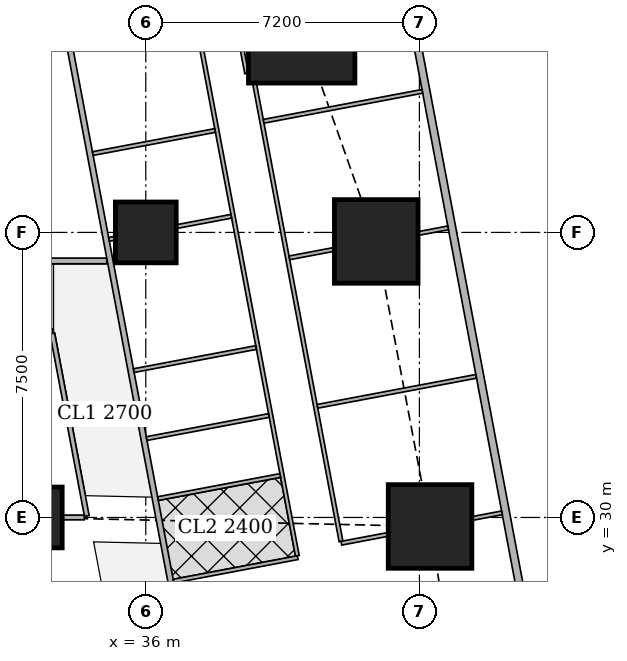
"""IFC4 building model, lengths in metres.
Left out: names, types, materials, properties, quantities, classifications, styles, units other than length and angle.
Written with IfcOpenShell. Run it as: python <this file> out.ifc"""

import sys

from ifc_helpers import new_model, si_unit, direction, frame, frame_2d, origin, origin_2d, place, context, subcontext, project, spatial, rectangle, extrude, element, fill, save


model = new_model("IFC4")
c1 = context("Model", 3, precision=1e-05, world=origin(), true_north=direction((0.0, 1.0)))
c2 = subcontext(c1, "Body", "Model", "MODEL_VIEW")
j1 = project(units=[si_unit("LENGTHUNIT", "METRE"), si_unit("PLANEANGLEUNIT", "RADIAN")], contexts=[c1])
p1 = place(None, origin())
s1 = spatial("IfcSite", under=j1, at=p1, CompositionType="ELEMENT")
p2 = place(p1, origin())
s2 = spatial("IfcBuilding", under=s1, at=p2, CompositionType="ELEMENT")
p3 = place(p2, frame((0.0, 0.0, 81.65)))
s3 = spatial("IfcBuildingStorey", under=s2, at=p3, CompositionType="ELEMENT", Elevation=81.65)
p4 = place(p3, frame((33.0, 30.0, 0.0), z_axis=(0.0, 0.0, 1.0), x_axis=(1.0, 0.0, 0.0)))
e1 = element("IfcColumn", 1, at=p4, inside=s3, PredefinedType="COLUMN", context=c2, shape_type="SweptSolid", body=[
    extrude(rectangle(XDim=1.6, YDim=1.6, at=origin_2d()), origin(), (0.0, 0.0, 1.0), 3.75),
])
p5 = place(p3, frame((43.48, 29.763, 0.0), z_axis=(0.0, 0.0, 1.0), x_axis=(1.0, 0.0, 0.0)))
e2 = element("IfcColumn", 2, at=p5, inside=s3, PredefinedType="COLUMN", context=c2, shape_type="SweptSolid", body=[
    extrude(rectangle(XDim=2.2, YDim=2.2, at=origin_2d()), origin(), (0.0, 0.0, 1.0), 3.75),
])
p6 = place(p3, frame((36.0, 37.5, 0.0), z_axis=(0.0, 0.0, 1.0), x_axis=(1.0, 0.0, 0.0)))
e3 = element("IfcColumn", 3, at=p6, inside=s3, PredefinedType="COLUMN", context=c2, shape_type="SweptSolid", body=[
    extrude(rectangle(XDim=1.6, YDim=1.6, at=origin_2d()), origin(), (0.0, 0.0, 1.0), 3.75),
])
p7 = place(p3, frame((42.064, 37.263, 0.0), z_axis=(0.0, 0.0, 1.0), x_axis=(1.0, 0.0, 0.0)))
e4 = element("IfcColumn", 4, at=p7, inside=s3, PredefinedType="COLUMN", context=c2, shape_type="SweptSolid", body=[
    extrude(rectangle(XDim=2.2, YDim=2.2, at=origin_2d()), origin(), (0.0, 0.0, 1.0), 3.75),
])
p8 = place(p3, frame((40.102, 42.83, 0.0), z_axis=(0.0, 0.0, 1.0), x_axis=(1.0, 0.0, 0.0)))
e5 = element("IfcColumn", 5, at=p8, inside=s3, PredefinedType="COLUMN", context=c2, shape_type="SweptSolid", body=[
    extrude(rectangle(XDim=2.8, YDim=2.8, at=origin_2d()), origin(), (0.0, 0.0, 1.0), 3.75),
])
p9 = place(p3, frame((50.653, 2.703, 0.0), z_axis=(0.0, 0.0, 1.0), x_axis=(-0.185612026696, 0.982623109613, 0.0)))
e6 = element("IfcWall", 6, at=p9, inside=s3, PredefinedType="SOLIDWALL", context=c2, shape_type="SweptSolid", body=[
    extrude(rectangle(XDim=41.393, YDim=0.2, at=frame_2d((20.697, 0.0))), origin(), (0.0, 0.0, 1.0), 3.5),
])
p10 = place(p9, frame((1.633, 0.0, 0.9)))
e7 = element("IfcOpeningElement", 7, at=p10, cuts=e6, PredefinedType="OPENING", context=c2, shape_type="SweptSolid", body=[
    extrude(rectangle(XDim=1.8, YDim=1.5, at=frame_2d((0.9, 0.75))), frame((0.0, 0.11, 0.0), z_axis=(0.0, -1.0, 0.0), x_axis=(1.0, 0.0, 0.0)), (0.0, 0.0, 1.0), 0.22),
])
p11 = place(p9, frame((6.032, 0.0, 0.9)))
e8 = element("IfcOpeningElement", 8, at=p11, cuts=e6, PredefinedType="OPENING", context=c2, shape_type="SweptSolid", body=[
    extrude(rectangle(XDim=1.8, YDim=1.5, at=frame_2d((0.9, 0.75))), frame((0.0, 0.11, 0.0), z_axis=(0.0, -1.0, 0.0), x_axis=(1.0, 0.0, 0.0)), (0.0, 0.0, 1.0), 0.22),
])
p12 = place(p9, frame((9.848, 0.0, 0.9)))
e9 = element("IfcOpeningElement", 9, at=p12, cuts=e6, PredefinedType="OPENING", context=c2, shape_type="SweptSolid", body=[
    extrude(rectangle(XDim=1.8, YDim=1.5, at=frame_2d((0.9, 0.75))), frame((0.0, 0.11, 0.0), z_axis=(0.0, -1.0, 0.0), x_axis=(1.0, 0.0, 0.0)), (0.0, 0.0, 1.0), 0.22),
])
p13 = place(p9, frame((13.664, 0.0, 0.9)))
e10 = element("IfcOpeningElement", 10, at=p13, cuts=e6, PredefinedType="OPENING", context=c2, shape_type="SweptSolid", body=[
    extrude(rectangle(XDim=1.8, YDim=1.5, at=frame_2d((0.9, 0.75))), frame((0.0, 0.11, 0.0), z_axis=(0.0, -1.0, 0.0), x_axis=(1.0, 0.0, 0.0)), (0.0, 0.0, 1.0), 0.22),
])
p14 = place(p9, frame((17.481, 0.0, 0.9)))
e11 = element("IfcOpeningElement", 11, at=p14, cuts=e6, PredefinedType="OPENING", context=c2, shape_type="SweptSolid", body=[
    extrude(rectangle(XDim=1.8, YDim=1.5, at=frame_2d((0.9, 0.75))), frame((0.0, 0.11, 0.0), z_axis=(0.0, -1.0, 0.0), x_axis=(1.0, 0.0, 0.0)), (0.0, 0.0, 1.0), 0.22),
])
p15 = place(p9, frame((21.297, 0.0, 0.9)))
e12 = element("IfcOpeningElement", 12, at=p15, cuts=e6, PredefinedType="OPENING", context=c2, shape_type="SweptSolid", body=[
    extrude(rectangle(XDim=1.8, YDim=1.5, at=frame_2d((0.9, 0.75))), frame((0.0, 0.11, 0.0), z_axis=(0.0, -1.0, 0.0), x_axis=(1.0, 0.0, 0.0)), (0.0, 0.0, 1.0), 0.22),
])
p16 = place(p9, frame((25.113, 0.0, 0.9)))
e13 = element("IfcOpeningElement", 13, at=p16, cuts=e6, PredefinedType="OPENING", context=c2, shape_type="SweptSolid", body=[
    extrude(rectangle(XDim=1.8, YDim=1.5, at=frame_2d((0.9, 0.75))), frame((0.0, 0.11, 0.0), z_axis=(0.0, -1.0, 0.0), x_axis=(1.0, 0.0, 0.0)), (0.0, 0.0, 1.0), 0.22),
])
p17 = place(p9, frame((28.93, 0.0, 0.9)))
e14 = element("IfcOpeningElement", 14, at=p17, cuts=e6, PredefinedType="OPENING", context=c2, shape_type="SweptSolid", body=[
    extrude(rectangle(XDim=1.8, YDim=1.5, at=frame_2d((0.9, 0.75))), frame((0.0, 0.11, 0.0), z_axis=(0.0, -1.0, 0.0), x_axis=(1.0, 0.0, 0.0)), (0.0, 0.0, 1.0), 0.22),
])
p18 = place(p9, frame((32.746, 0.0, 0.9)))
e15 = element("IfcOpeningElement", 15, at=p18, cuts=e6, PredefinedType="OPENING", context=c2, shape_type="SweptSolid", body=[
    extrude(rectangle(XDim=1.8, YDim=1.5, at=frame_2d((0.9, 0.75))), frame((0.0, 0.11, 0.0), z_axis=(0.0, -1.0, 0.0), x_axis=(1.0, 0.0, 0.0)), (0.0, 0.0, 1.0), 0.22),
])
p19 = place(p9, frame((36.481, 0.0, 0.9)))
e16 = element("IfcOpeningElement", 16, at=p19, cuts=e6, PredefinedType="OPENING", context=c2, shape_type="SweptSolid", body=[
    extrude(rectangle(XDim=1.8, YDim=1.5, at=frame_2d((0.9, 0.75))), frame((0.0, 0.11, 0.0), z_axis=(0.0, -1.0, 0.0), x_axis=(1.0, 0.0, 0.0)), (0.0, 0.0, 1.0), 0.22),
])
p20 = place(p3, frame((29.601, 36.75, 0.0), z_axis=(0.0, 0.0, 1.0), x_axis=(1.0, 0.0, 0.0)))
e17 = element("IfcWall", 17, at=p20, inside=s3, PredefinedType="SOLIDWALL", context=c2, shape_type="SweptSolid", body=[
    extrude(rectangle(XDim=5.372, YDim=0.15, at=frame_2d((2.686, 0.0))), origin(), (0.0, 0.0, 1.0), 3.5),
])
p21 = place(p20, frame((2.845, 0.0, 0.0)))
e18 = element("IfcOpeningElement", 18, at=p21, cuts=e17, PredefinedType="OPENING", context=c2, shape_type="SweptSolid", body=[
    extrude(rectangle(XDim=1.0, YDim=2.1, at=frame_2d((0.5, 1.05))), frame((0.0, 0.085, 0.0), z_axis=(0.0, -1.0, 0.0), x_axis=(1.0, 0.0, 0.0)), (0.0, 0.0, 1.0), 0.17),
])
p22 = place(p3, frame((33.382, 45.65, 0.0), z_axis=(0.0, 0.0, 1.0), x_axis=(0.185593544777, -0.982626600565, 0.0)))
e19 = element("IfcWall", 19, at=p22, inside=s3, PredefinedType="SOLIDWALL", context=c2, shape_type="SweptSolid", body=[
    extrude(rectangle(XDim=47.118, YDim=0.15, at=frame_2d((23.559, 0.0))), origin(), (0.0, 0.0, 1.0), 2.2),
])
p23 = place(p22, frame((19.054, 0.0, 0.0)))
e20 = element("IfcOpeningElement", 20, at=p23, cuts=e19, PredefinedType="OPENING", context=c2, shape_type="SweptSolid", body=[
    extrude(rectangle(XDim=1.0, YDim=2.1, at=frame_2d((0.5, 1.05))), frame((0.0, 0.085, 0.0), z_axis=(0.0, -1.0, 0.0), x_axis=(1.0, 0.0, 0.0)), (0.0, 0.0, 1.0), 0.17),
])
p24 = place(p22, frame((22.87, 0.0, 0.0)))
e21 = element("IfcOpeningElement", 21, at=p24, cuts=e19, PredefinedType="OPENING", context=c2, shape_type="SweptSolid", body=[
    extrude(rectangle(XDim=1.0, YDim=2.1, at=frame_2d((0.5, 1.05))), frame((0.0, 0.085, 0.0), z_axis=(0.0, -1.0, 0.0), x_axis=(1.0, 0.0, 0.0)), (0.0, 0.0, 1.0), 0.17),
])
p25 = place(p22, frame((33.833, 0.0, 0.0)))
e22 = element("IfcOpeningElement", 22, at=p25, cuts=e19, PredefinedType="OPENING", context=c2, shape_type="SweptSolid", body=[
    extrude(rectangle(XDim=1.0, YDim=2.1, at=frame_2d((0.5, 1.05))), frame((0.0, 0.085, 0.0), z_axis=(0.0, -1.0, 0.0), x_axis=(1.0, 0.0, 0.0)), (0.0, 0.0, 1.0), 0.17),
])
p26 = place(p3, frame((38.654, 41.686, 0.0), z_axis=(0.0, 0.0, 1.0), x_axis=(-0.185676896978, 0.982610853761, 0.0)))
e23 = element("IfcWall", 23, at=p26, inside=s3, PredefinedType="PARTITIONING", context=c2, shape_type="SweptSolid", body=[
    extrude(rectangle(XDim=4.034, YDim=0.1, at=frame_2d((2.017, 0.0))), origin(), (0.0, 0.0, 1.0), 2.05),
])
p27 = place(p3, frame((38.862, 41.42, 0.0), z_axis=(0.0, 0.0, 1.0), x_axis=(0.185529020159, -0.982638785454, 0.0)))
e24 = element("IfcWall", 24, at=p27, inside=s3, PredefinedType="PARTITIONING", context=c2, shape_type="SweptSolid", body=[
    extrude(rectangle(XDim=12.262, YDim=0.1, at=frame_2d((6.131, 0.0))), origin(), (0.0, 0.0, 1.0), 2.5),
])
p28 = place(p27, frame((11.212, 0.0, 0.0)))
e25 = element("IfcOpeningElement", 25, at=p28, cuts=e24, PredefinedType="OPENING", context=c2, shape_type="SweptSolid", body=[
    extrude(rectangle(XDim=0.9, YDim=2.1, at=frame_2d((0.45, 1.05))), frame((0.0, 0.06, 0.0), z_axis=(0.0, -1.0, 0.0), x_axis=(1.0, 0.0, 0.0)), (0.0, 0.0, 1.0), 0.12),
])
p29 = place(p27, frame((7.555, 0.0, 0.0)))
e26 = element("IfcOpeningElement", 26, at=p29, cuts=e24, PredefinedType="OPENING", context=c2, shape_type="SweptSolid", body=[
    extrude(rectangle(XDim=0.9, YDim=2.1, at=frame_2d((0.45, 1.05))), frame((0.0, 0.06, 0.0), z_axis=(0.0, -1.0, 0.0), x_axis=(1.0, 0.0, 0.0)), (0.0, 0.0, 1.0), 0.12),
])
p30 = place(p27, frame((3.579, 0.0, 0.0)))
e27 = element("IfcOpeningElement", 27, at=p30, cuts=e24, PredefinedType="OPENING", context=c2, shape_type="SweptSolid", body=[
    extrude(rectangle(XDim=0.9, YDim=2.1, at=frame_2d((0.45, 1.05))), frame((0.0, 0.06, 0.0), z_axis=(0.0, -1.0, 0.0), x_axis=(1.0, 0.0, 0.0)), (0.0, 0.0, 1.0), 0.12),
])
p31 = place(p3, frame((37.473, 42.309, 0.0), z_axis=(0.0, 0.0, 1.0), x_axis=(0.185570636839, -0.982630927024, 0.0)))
e28 = element("IfcWall", 28, at=p31, inside=s3, PredefinedType="PARTITIONING", context=c2, shape_type="SweptSolid", body=[
    extrude(rectangle(XDim=13.553, YDim=0.1, at=frame_2d((6.777, 0.0))), origin(), (0.0, 0.0, 1.0), 2.5),
])
p32 = place(p31, frame((12.049, 0.0, 0.0)))
e29 = element("IfcOpeningElement", 29, at=p32, cuts=e28, PredefinedType="OPENING", context=c2, shape_type="SweptSolid", body=[
    extrude(rectangle(XDim=0.9, YDim=2.1, at=frame_2d((0.45, 1.05))), frame((0.0, 0.06, 0.0), z_axis=(0.0, -1.0, 0.0), x_axis=(1.0, 0.0, 0.0)), (0.0, 0.0, 1.0), 0.12),
])
p33 = place(p31, frame((8.427, 0.0, 0.0)))
e30 = element("IfcOpeningElement", 30, at=p33, cuts=e28, PredefinedType="OPENING", context=c2, shape_type="SweptSolid", body=[
    extrude(rectangle(XDim=0.9, YDim=2.1, at=frame_2d((0.45, 1.05))), frame((0.0, 0.06, 0.0), z_axis=(0.0, -1.0, 0.0), x_axis=(1.0, 0.0, 0.0)), (0.0, 0.0, 1.0), 0.12),
])
p34 = place(p31, frame((2.853, 0.0, 0.0)))
e31 = element("IfcOpeningElement", 31, at=p34, cuts=e28, PredefinedType="OPENING", context=c2, shape_type="SweptSolid", body=[
    extrude(rectangle(XDim=0.9, YDim=2.1, at=frame_2d((0.45, 1.05))), frame((0.0, 0.06, 0.0), z_axis=(0.0, -1.0, 0.0), x_axis=(1.0, 0.0, 0.0)), (0.0, 0.0, 1.0), 0.12),
])
p35 = place(p31, frame((10.14, 0.0, 0.0)))
e32 = element("IfcOpeningElement", 32, at=p35, cuts=e28, PredefinedType="OPENING", context=c2, shape_type="SweptSolid", body=[
    extrude(rectangle(XDim=0.9, YDim=2.1, at=frame_2d((0.45, 1.05))), frame((0.0, 0.06, 0.0), z_axis=(0.0, -1.0, 0.0), x_axis=(1.0, 0.0, 0.0)), (0.0, 0.0, 1.0), 0.12),
])
p36 = place(p31, frame((5.759, 0.0, 0.0)))
e33 = element("IfcOpeningElement", 33, at=p36, cuts=e28, PredefinedType="OPENING", context=c2, shape_type="SweptSolid", body=[
    extrude(rectangle(XDim=0.9, YDim=2.1, at=frame_2d((0.45, 1.05))), frame((0.0, 0.06, 0.0), z_axis=(0.0, -1.0, 0.0), x_axis=(1.0, 0.0, 0.0)), (0.0, 0.0, 1.0), 0.12),
])
p37 = place(p3, frame((43.277, 41.212, 0.0), z_axis=(0.0, 0.0, 1.0), x_axis=(-0.982665405803, -0.185387972203, 0.0)))
e34 = element("IfcWall", 34, at=p37, inside=s3, PredefinedType="PARTITIONING", context=c2, shape_type="SweptSolid", body=[
    extrude(rectangle(XDim=4.25, YDim=0.1, at=frame_2d((2.125, 0.0))), origin(), (0.0, 0.0, 1.0), 2.05),
])
p38 = place(p3, frame((43.955, 37.62, 0.0), z_axis=(0.0, 0.0, 1.0), x_axis=(-0.98247004097, -0.186420542316, 0.0)))
e35 = element("IfcWall", 35, at=p38, inside=s3, PredefinedType="PARTITIONING", context=c2, shape_type="SweptSolid", body=[
    extrude(rectangle(XDim=0.795, YDim=0.1, at=frame_2d((0.397, 0.0))), origin(), (0.0, 0.0, 1.0), 2.05),
])
p39 = place(p3, frame((40.954, 37.053, 0.0), z_axis=(0.0, 0.0, 1.0), x_axis=(-0.982628652346, -0.185582681276, 0.0)))
e36 = element("IfcWall", 36, at=p39, inside=s3, PredefinedType="PARTITIONING", context=c2, shape_type="SweptSolid", body=[
    extrude(rectangle(XDim=1.196, YDim=0.1, at=frame_2d((0.598, 0.0))), origin(), (0.0, 0.0, 1.0), 2.05),
])
p40 = place(p3, frame((44.693, 33.713, 0.0), z_axis=(0.0, 0.0, 1.0), x_axis=(-0.982623519589, -0.185609856287, 0.0)))
e37 = element("IfcWall", 37, at=p40, inside=s3, PredefinedType="PARTITIONING", context=c2, shape_type="SweptSolid", body=[
    extrude(rectangle(XDim=4.25, YDim=0.1, at=frame_2d((2.125, 0.0))), origin(), (0.0, 0.0, 1.0), 2.2),
])
p41 = place(p3, frame((45.372, 30.121, 0.0), z_axis=(0.0, 0.0, 1.0), x_axis=(-0.982512656401, -0.186195810938, 0.0)))
e38 = element("IfcWall", 38, at=p41, inside=s3, PredefinedType="PARTITIONING", context=c2, shape_type="SweptSolid", body=[
    extrude(rectangle(XDim=0.796, YDim=0.1, at=frame_2d((0.398, 0.0))), origin(), (0.0, 0.0, 1.0), 3.5),
])
p42 = place(p3, frame((42.37, 29.553, 0.0), z_axis=(0.0, 0.0, 1.0), x_axis=(-0.98263602344, -0.185543648338, 0.0)))
e39 = element("IfcWall", 39, at=p42, inside=s3, PredefinedType="PARTITIONING", context=c2, shape_type="SweptSolid", body=[
    extrude(rectangle(XDim=1.245, YDim=0.1, at=frame_2d((0.623, 0.0))), origin(), (0.0, 0.0, 1.0), 2.5),
])
p43 = place(p3, frame((37.824, 40.182, 0.0), z_axis=(0.0, 0.0, 1.0), x_axis=(-0.982674977865, -0.185337227447, 0.0)))
e40 = element("IfcWall", 40, at=p43, inside=s3, PredefinedType="PARTITIONING", context=c2, shape_type="SweptSolid", body=[
    extrude(rectangle(XDim=3.275, YDim=0.1, at=frame_2d((1.637, 0.0))), origin(), (0.0, 0.0, 1.0), 3.5),
])
p44 = place(p3, frame((38.25, 37.925, 0.0), z_axis=(0.0, 0.0, 1.0), x_axis=(-0.982626127294, -0.185596050493, 0.0)))
e41 = element("IfcWall", 41, at=p44, inside=s3, PredefinedType="PARTITIONING", context=c2, shape_type="SweptSolid", body=[
    extrude(rectangle(XDim=1.465, YDim=0.1, at=frame_2d((0.733, 0.0))), origin(), (0.0, 0.0, 1.0), 3.5),
])
p45 = place(p3, frame((35.19, 37.347, 0.0), z_axis=(0.0, 0.0, 1.0), x_axis=(-0.982404955251, -0.186763229514, 0.0)))
e42 = element("IfcWall", 42, at=p45, inside=s3, PredefinedType="PARTITIONING", context=c2, shape_type="SweptSolid", body=[
    extrude(rectangle(XDim=0.161, YDim=0.1, at=frame_2d((0.081, 0.0))), origin(), (0.0, 0.0, 1.0), 3.5),
])
p46 = place(p3, frame((39.24, 32.683, 0.0), z_axis=(0.0, 0.0, 1.0), x_axis=(-0.982607026909, -0.185697147715, 0.0)))
e43 = element("IfcWall", 43, at=p46, inside=s3, PredefinedType="PARTITIONING", context=c2, shape_type="SweptSolid", body=[
    extrude(rectangle(XDim=3.275, YDim=0.1, at=frame_2d((1.637, 0.0))), origin(), (0.0, 0.0, 1.0), 3.5),
])
p47 = place(p3, frame((39.997, 28.942, 0.0), z_axis=(0.0, 0.0, 1.0), x_axis=(-0.982569883123, -0.185893584556, 0.0)))
e44 = element("IfcWall", 44, at=p47, inside=s3, PredefinedType="PARTITIONING", context=c2, shape_type="SweptSolid", body=[
    extrude(rectangle(XDim=3.324, YDim=0.1, at=frame_2d((1.662, 0.0))), origin(), (0.0, 0.0, 1.0), 3.5),
])
p48 = place(p3, frame((39.538, 31.104, 0.0), z_axis=(0.0, 0.0, 1.0), x_axis=(-0.982610347627, -0.185679575441, 0.0)))
e45 = element("IfcWall", 45, at=p48, inside=s3, PredefinedType="PARTITIONING", context=c2, shape_type="SweptSolid", body=[
    extrude(rectangle(XDim=3.274, YDim=0.1, at=frame_2d((1.637, 0.0))), origin(), (0.0, 0.0, 1.0), 2.5),
])
p49 = place(p3, frame((38.902, 34.471, 0.0), z_axis=(0.0, 0.0, 1.0), x_axis=(-0.982664729897, -0.18539155487, 0.0)))
e46 = element("IfcWall", 46, at=p49, inside=s3, PredefinedType="PARTITIONING", context=c2, shape_type="SweptSolid", body=[
    extrude(rectangle(XDim=3.274, YDim=0.1, at=frame_2d((1.637, 0.0))), origin(), (0.0, 0.0, 1.0), 3.5),
])
p50 = place(p3, frame((28.95, 34.9, 0.0), z_axis=(0.0, 0.0, 1.0), x_axis=(1.0, 0.0, 0.0)))
e47 = element("IfcWall", 47, at=p50, inside=s3, PredefinedType="PARTITIONING", context=c2, shape_type="SweptSolid", body=[
    extrude(rectangle(XDim=4.588, YDim=0.125, at=frame_2d((2.294, 0.0))), origin(), (0.0, 0.0, 1.0), 3.5),
])
p51 = place(p3, frame((34.448, 30.04, 0.0), z_axis=(0.0, 0.0, 1.0), x_axis=(-0.185749459238, 0.982597139418, 0.0)))
e48 = element("IfcWall", 48, at=p51, inside=s3, PredefinedType="PARTITIONING", context=c2, shape_type="SweptSolid", body=[
    extrude(rectangle(XDim=4.883, YDim=0.125, at=frame_2d((2.441, 0.0))), origin(), (0.0, 0.0, 1.0), 2.5),
])
p52 = place(p51, frame((1.05, 0.0, 0.0)))
e49 = element("IfcOpeningElement", 49, at=p52, cuts=e48, PredefinedType="OPENING", context=c2, shape_type="SweptSolid", body=[
    extrude(rectangle(XDim=1.0, YDim=2.1, at=frame_2d((0.5, 1.05))), frame((0.0, 0.073, 0.0), z_axis=(0.0, -1.0, 0.0), x_axis=(1.0, 0.0, 0.0)), (0.0, 0.0, 1.0), 0.145),
])
p53 = place(p3, frame((34.535, 22.574, 0.0), z_axis=(0.0, 0.0, 1.0), x_axis=(-0.185591596381, 0.982626968566, 0.0)))
e50 = element("IfcWall", 50, at=p53, inside=s3, PredefinedType="PARTITIONING", context=c2, shape_type="SweptSolid", body=[
    extrude(rectangle(XDim=6.73, YDim=0.125, at=frame_2d((3.365, 0.0))), origin(), (0.0, 0.0, 1.0), 2.5),
])
p54 = place(p53, frame((3.241, 0.0, 0.0)))
e51 = element("IfcOpeningElement", 51, at=p54, cuts=e50, PredefinedType="OPENING", context=c2, shape_type="SweptSolid", body=[
    extrude(rectangle(XDim=1.0, YDim=2.1, at=frame_2d((0.5, 1.05))), frame((0.0, 0.073, 0.0), z_axis=(0.0, -1.0, 0.0), x_axis=(1.0, 0.0, 0.0)), (0.0, 0.0, 1.0), 0.145),
])
p55 = place(p3, frame((33.801, 30.0, 0.0), z_axis=(0.0, 0.0, 1.0), x_axis=(1.0, 0.0, 0.0)))
e52 = element("IfcWall", 52, at=p55, inside=s3, PredefinedType="PARTITIONING", context=c2, shape_type="SweptSolid", body=[
    extrude(rectangle(XDim=0.579, YDim=0.125, at=frame_2d((0.29, 0.0))), origin(), (0.0, 0.0, 1.0), 2.5),
])
p56 = place(p16, origin())
e53 = element("IfcWindow", 53, at=p56, inside=s3, PartitioningType="SINGLE_PANEL", PredefinedType="WINDOW", context=c2, shape_type="SweptSolid", body=[
    extrude(rectangle(XDim=1.8, YDim=1.5, at=frame_2d((0.9, 0.75))), frame((0.0, 0.03, 0.0), z_axis=(0.0, -1.0, 0.0), x_axis=(1.0, 0.0, 0.0)), (0.0, 0.0, 1.0), 0.06),
])
fill(e13, e53)
p57 = place(p17, origin())
e54 = element("IfcWindow", 54, at=p57, inside=s3, PartitioningType="SINGLE_PANEL", PredefinedType="WINDOW", context=c2, shape_type="SweptSolid", body=[
    extrude(rectangle(XDim=1.8, YDim=1.5, at=frame_2d((0.9, 0.75))), frame((0.0, 0.03, 0.0), z_axis=(0.0, -1.0, 0.0), x_axis=(1.0, 0.0, 0.0)), (0.0, 0.0, 1.0), 0.06),
])
fill(e14, e54)
p58 = place(p18, origin())
e55 = element("IfcWindow", 55, at=p58, inside=s3, PartitioningType="SINGLE_PANEL", PredefinedType="WINDOW", context=c2, shape_type="SweptSolid", body=[
    extrude(rectangle(XDim=1.8, YDim=1.5, at=frame_2d((0.9, 0.75))), frame((0.0, 0.03, 0.0), z_axis=(0.0, -1.0, 0.0), x_axis=(1.0, 0.0, 0.0)), (0.0, 0.0, 1.0), 0.06),
])
fill(e15, e55)
p59 = place(p19, origin())
e56 = element("IfcWindow", 56, at=p59, inside=s3, PartitioningType="SINGLE_PANEL", PredefinedType="WINDOW", context=c2, shape_type="SweptSolid", body=[
    extrude(rectangle(XDim=1.8, YDim=1.5, at=frame_2d((0.9, 0.75))), frame((0.0, 0.03, 0.0), z_axis=(0.0, -1.0, 0.0), x_axis=(1.0, 0.0, 0.0)), (0.0, 0.0, 1.0), 0.06),
])
fill(e16, e56)
p60 = place(p28, origin())
e57 = element("IfcDoor", 57, at=p60, inside=s3, OperationType="SINGLE_SWING_RIGHT", PredefinedType="DOOR", context=c2, shape_type="SweptSolid", body=[
    extrude(rectangle(XDim=0.9, YDim=2.1, at=frame_2d((0.45, 1.05))), frame((0.0, 0.025, 0.0), z_axis=(0.0, -1.0, 0.0), x_axis=(1.0, 0.0, 0.0)), (0.0, 0.0, 1.0), 0.05),
])
fill(e25, e57)
p61 = place(p29, origin())
e58 = element("IfcDoor", 58, at=p61, inside=s3, OperationType="SINGLE_SWING_RIGHT", PredefinedType="DOOR", context=c2, shape_type="SweptSolid", body=[
    extrude(rectangle(XDim=0.9, YDim=2.1, at=frame_2d((0.45, 1.05))), frame((0.0, 0.025, 0.0), z_axis=(0.0, -1.0, 0.0), x_axis=(1.0, 0.0, 0.0)), (0.0, 0.0, 1.0), 0.05),
])
fill(e26, e58)
p62 = place(p30, origin())
e59 = element("IfcDoor", 59, at=p62, inside=s3, OperationType="SINGLE_SWING_RIGHT", PredefinedType="DOOR", context=c2, shape_type="SweptSolid", body=[
    extrude(rectangle(XDim=0.9, YDim=2.1, at=frame_2d((0.45, 1.05))), frame((0.0, 0.025, 0.0), z_axis=(0.0, -1.0, 0.0), x_axis=(1.0, 0.0, 0.0)), (0.0, 0.0, 1.0), 0.05),
])
fill(e27, e59)
p63 = place(p32, origin())
e60 = element("IfcDoor", 60, at=p63, inside=s3, OperationType="SINGLE_SWING_LEFT", PredefinedType="DOOR", context=c2, shape_type="SweptSolid", body=[
    extrude(rectangle(XDim=0.9, YDim=2.1, at=frame_2d((0.45, 1.05))), frame((0.0, 0.025, 0.0), z_axis=(0.0, -1.0, 0.0), x_axis=(1.0, 0.0, 0.0)), (0.0, 0.0, 1.0), 0.05),
])
fill(e29, e60)
p64 = place(p33, origin())
e61 = element("IfcDoor", 61, at=p64, inside=s3, OperationType="SINGLE_SWING_RIGHT", PredefinedType="DOOR", context=c2, shape_type="SweptSolid", body=[
    extrude(rectangle(XDim=0.9, YDim=2.1, at=frame_2d((0.45, 1.05))), frame((0.0, 0.025, 0.0), z_axis=(0.0, -1.0, 0.0), x_axis=(1.0, 0.0, 0.0)), (0.0, 0.0, 1.0), 0.05),
])
fill(e30, e61)
p65 = place(p34, origin())
e62 = element("IfcDoor", 62, at=p65, inside=s3, OperationType="SINGLE_SWING_RIGHT", PredefinedType="DOOR", context=c2, shape_type="SweptSolid", body=[
    extrude(rectangle(XDim=0.9, YDim=2.1, at=frame_2d((0.45, 1.05))), frame((0.0, 0.025, 0.0), z_axis=(0.0, -1.0, 0.0), x_axis=(1.0, 0.0, 0.0)), (0.0, 0.0, 1.0), 0.05),
])
fill(e31, e62)
p66 = place(p35, origin())
e63 = element("IfcDoor", 63, at=p66, inside=s3, OperationType="SINGLE_SWING_LEFT", PredefinedType="DOOR", context=c2, shape_type="SweptSolid", body=[
    extrude(rectangle(XDim=0.9, YDim=2.1, at=frame_2d((0.45, 1.05))), frame((0.0, 0.025, 0.0), z_axis=(0.0, -1.0, 0.0), x_axis=(1.0, 0.0, 0.0)), (0.0, 0.0, 1.0), 0.05),
])
fill(e32, e63)
p67 = place(p36, origin())
e64 = element("IfcDoor", 64, at=p67, inside=s3, OperationType="SINGLE_SWING_LEFT", PredefinedType="DOOR", context=c2, shape_type="SweptSolid", body=[
    extrude(rectangle(XDim=0.9, YDim=2.1, at=frame_2d((0.45, 1.05))), frame((0.0, 0.025, 0.0), z_axis=(0.0, -1.0, 0.0), x_axis=(1.0, 0.0, 0.0)), (0.0, 0.0, 1.0), 0.05),
])
fill(e33, e64)
p68 = place(p52, origin())
e65 = element("IfcDoor", 65, at=p68, inside=s3, OperationType="SINGLE_SWING_LEFT", PredefinedType="DOOR", context=c2, shape_type="SweptSolid", body=[
    extrude(rectangle(XDim=1.0, YDim=2.1, at=frame_2d((0.5, 1.05))), frame((0.0, 0.025, 0.0), z_axis=(0.0, -1.0, 0.0), x_axis=(1.0, 0.0, 0.0)), (0.0, 0.0, 1.0), 0.05),
])
fill(e49, e65)
save(model, sys.argv[1])
